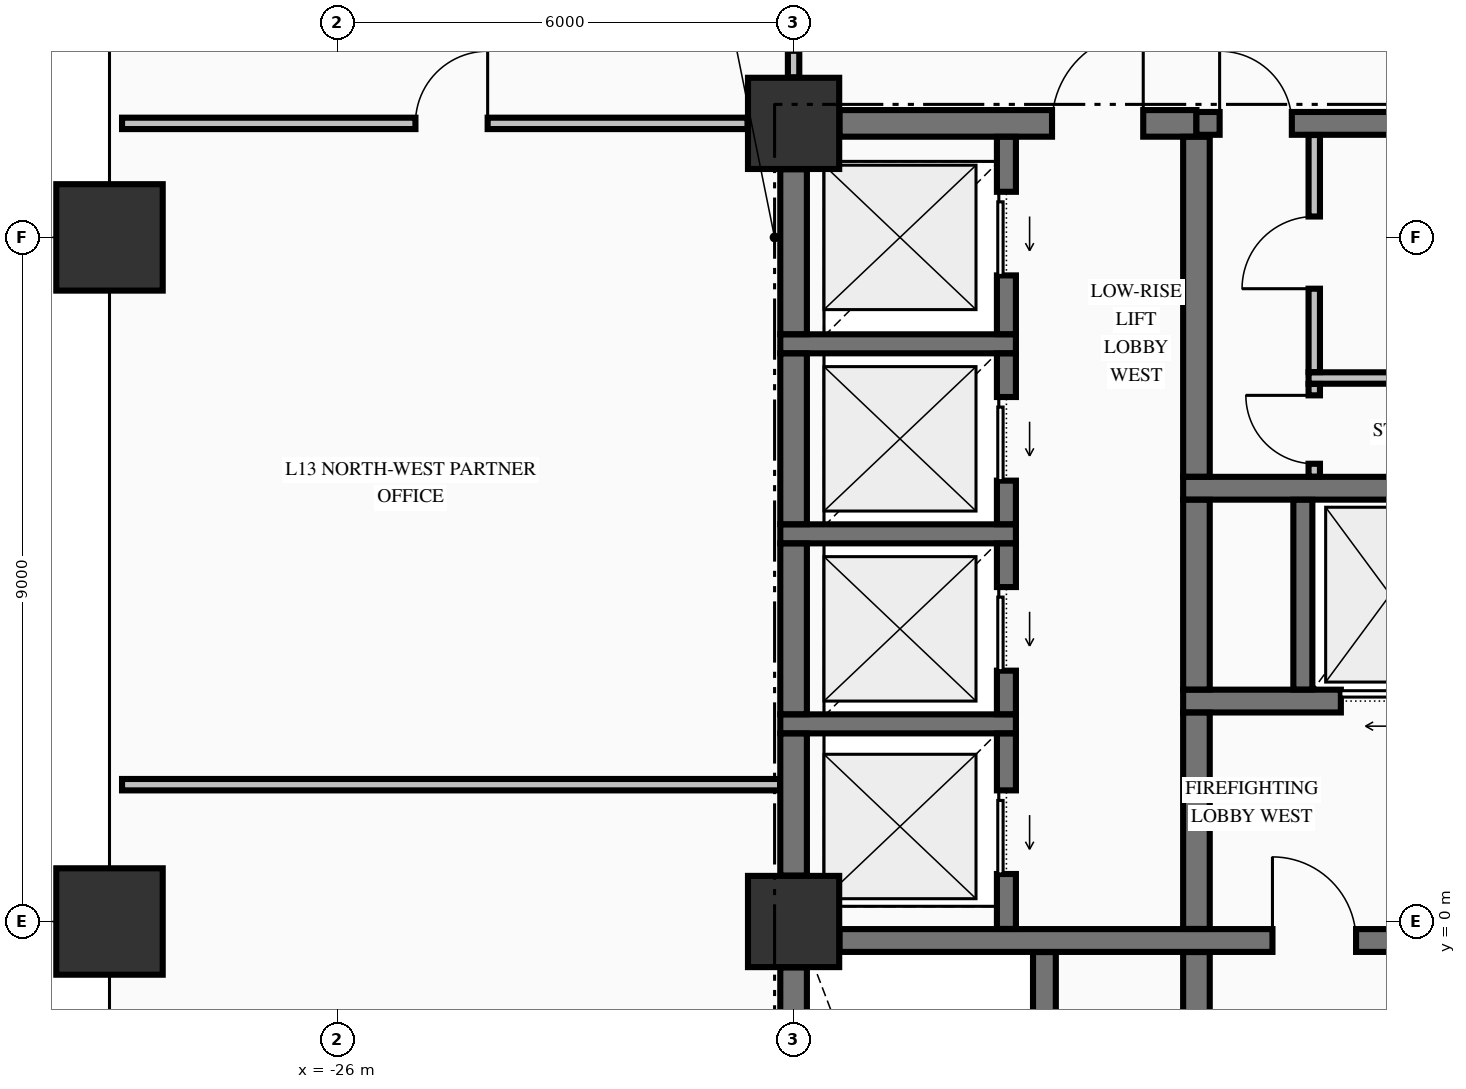
"""IFC4 building model, lengths in metres.
Left out: names, types, materials, properties, quantities, classifications, styles, units other than length and angle.
Written with IfcOpenShell. Run it as: python <this file> out.ifc"""

import sys

from ifc_helpers import new_model, si_unit, direction, frame, frame_2d, origin, origin_2d, place, context, subcontext, project, spatial, rectangle, extrude, element, fill, save


model = new_model("IFC4")
c1 = context("Model", 3, precision=1e-05, world=origin(), true_north=direction((0.0, 1.0)))
c2 = subcontext(c1, "Body", "Model", "MODEL_VIEW")
j1 = project(units=[si_unit("LENGTHUNIT", "METRE"), si_unit("PLANEANGLEUNIT", "RADIAN")], contexts=[c1])
p1 = place(None, origin())
s1 = spatial("IfcSite", under=j1, at=p1, CompositionType="ELEMENT")
p2 = place(p1, origin())
s2 = spatial("IfcBuilding", under=s1, at=p2, CompositionType="ELEMENT")
p3 = place(p2, frame((0.0, 0.0, 57.19)))
s3 = spatial("IfcBuildingStorey", under=s2, at=p3, CompositionType="ELEMENT", Elevation=57.19)
for number, where, z_axis, x_axis in (
    (1, (-29.0, 0.0, -0.425), (0.0, 0.0, 1.0), (1.0, 0.0, 0.0)),
    (2, (-29.0, 9.0, -0.425), (0.0, 0.0, 1.0), (1.0, 0.0, 0.0)),
):
    element("IfcColumn", number, at=place(p3, frame(where, z_axis=z_axis, x_axis=x_axis)), inside=s3, PredefinedType="COLUMN", context=c2, shape_type="SweptSolid", body=[
        extrude(rectangle(XDim=1.4, YDim=1.4, at=origin_2d()), origin(), (0.0, 0.0, 1.0), 3.695),
    ])
for number, where, z_axis, x_axis in (
    (3, (-20.0, 10.5, -0.425), (0.0, 0.0, 1.0), (1.0, 0.0, 0.0)),
    (4, (-20.0, 0.0, -0.425), (0.0, 0.0, 1.0), (1.0, 0.0, 0.0)),
):
    element("IfcColumn", number, at=place(p3, frame(where, z_axis=z_axis, x_axis=x_axis)), inside=s3, PredefinedType="COLUMN", context=c2, shape_type="SweptSolid", body=[
        extrude(rectangle(XDim=1.2, YDim=1.2, at=origin_2d()), origin(), (0.0, 0.0, 1.0), 3.695),
    ])
p4 = place(p3, frame((-19.396, -0.25, 0.0), z_axis=(0.0, 0.0, 1.0), x_axis=(1.0, 0.0, 0.0)))
e5 = element("IfcWall", 5, at=p4, inside=s3, PredefinedType="SHEAR", context=c2, shape_type="SweptSolid", body=[
    extrude(rectangle(XDim=7.792, YDim=0.3, at=frame_2d((3.896, 0.0))), origin(), (0.0, 0.0, 1.0), 3.27),
])
p5 = place(p4, frame((5.696, 0.0, 0.0)))
e6 = element("IfcOpeningElement", 6, at=p5, cuts=e5, PredefinedType="OPENING", context=c2, shape_type="SweptSolid", body=[
    extrude(rectangle(XDim=1.1, YDim=2.15, at=frame_2d((0.55, 1.075))), frame((0.0, 0.16, 0.0), z_axis=(0.0, -1.0, 0.0), x_axis=(1.0, 0.0, 0.0)), (0.0, 0.0, 1.0), 0.32),
])
p6 = place(p3, frame((-20.175, 2.6, 0.0), z_axis=(0.0, 0.0, 1.0), x_axis=(1.0, 0.0, 0.0)))
e7 = element("IfcWall", 7, at=p6, inside=s3, PredefinedType="SOLIDWALL", context=c2, shape_type="SweptSolid", body=[
    extrude(rectangle(XDim=3.1, YDim=0.25, at=frame_2d((1.55, 0.0))), origin(), (0.0, 0.0, 1.0), 3.27),
])
p7 = place(p3, frame((-14.875, 2.9, 0.0), z_axis=(0.0, 0.0, 1.0), x_axis=(1.0, 0.0, 0.0)))
e8 = element("IfcWall", 8, at=p7, inside=s3, PredefinedType="SHEAR", context=c2, shape_type="SweptSolid", body=[
    extrude(rectangle(XDim=4.025, YDim=0.3, at=frame_2d((2.012, 0.0))), origin(), (0.0, 0.0, 1.0), 3.27),
])
p8 = place(p7, frame((2.075, 0.0, 0.0)))
e9 = element("IfcOpeningElement", 9, at=p8, cuts=e8, PredefinedType="OPENING", context=c2, shape_type="SweptSolid", body=[
    extrude(rectangle(XDim=1.1, YDim=2.2, at=frame_2d((0.55, 1.1))), frame((0.0, 0.16, 0.0), z_axis=(0.0, -1.0, 0.0), x_axis=(1.0, 0.0, 0.0)), (0.0, 0.0, 1.0), 0.32),
])
p9 = place(p3, frame((-20.175, 5.1, 0.0), z_axis=(0.0, 0.0, 1.0), x_axis=(1.0, 0.0, 0.0)))
e10 = element("IfcWall", 10, at=p9, inside=s3, PredefinedType="SOLIDWALL", context=c2, shape_type="SweptSolid", body=[
    extrude(rectangle(XDim=3.1, YDim=0.25, at=frame_2d((1.55, 0.0))), origin(), (0.0, 0.0, 1.0), 3.27),
])
p10 = place(p3, frame((-14.875, 5.7, 0.0), z_axis=(0.0, 0.0, 1.0), x_axis=(1.0, 0.0, 0.0)))
e11 = element("IfcWall", 11, at=p10, inside=s3, PredefinedType="SHEAR", context=c2, shape_type="SweptSolid", body=[
    extrude(rectangle(XDim=4.025, YDim=0.3, at=frame_2d((2.012, 0.0))), origin(), (0.0, 0.0, 1.0), 3.27),
])
p11 = place(p3, frame((-20.175, 7.6, 0.0), z_axis=(0.0, 0.0, 1.0), x_axis=(1.0, 0.0, 0.0)))
e12 = element("IfcWall", 12, at=p11, inside=s3, PredefinedType="SOLIDWALL", context=c2, shape_type="SweptSolid", body=[
    extrude(rectangle(XDim=3.1, YDim=0.25, at=frame_2d((1.55, 0.0))), origin(), (0.0, 0.0, 1.0), 3.27),
])
p12 = place(p3, frame((-19.396, 10.5, 0.0), z_axis=(0.0, 0.0, 1.0), x_axis=(1.0, 0.0, 0.0)))
e13 = element("IfcWall", 13, at=p12, inside=s3, PredefinedType="SHEAR", context=c2, shape_type="SweptSolid", body=[
    extrude(rectangle(XDim=4.696, YDim=0.35, at=frame_2d((2.348, 0.0))), origin(), (0.0, 0.0, 1.0), 3.27),
])
p13 = place(p12, frame((2.796, 0.0, 0.0)))
e14 = element("IfcOpeningElement", 14, at=p13, cuts=e13, PredefinedType="OPENING", context=c2, shape_type="SweptSolid", body=[
    extrude(rectangle(XDim=1.2, YDim=2.15, at=frame_2d((0.6, 1.075))), frame((0.0, 0.185, 0.0), z_axis=(0.0, -1.0, 0.0), x_axis=(1.0, 0.0, 0.0)), (0.0, 0.0, 1.0), 0.37),
])
p14 = place(p3, frame((-14.7, 10.5, 0.0), z_axis=(0.0, 0.0, 1.0), x_axis=(1.0, 0.0, 0.0)))
e15 = element("IfcWall", 15, at=p14, inside=s3, PredefinedType="SHEAR", context=c2, shape_type="SweptSolid", body=[
    extrude(rectangle(XDim=3.096, YDim=0.3, at=frame_2d((1.548, 0.0))), origin(), (0.0, 0.0, 1.0), 3.27),
])
p15 = place(p14, frame((0.305, 0.0, 0.0)))
e16 = element("IfcOpeningElement", 16, at=p15, cuts=e15, PredefinedType="OPENING", context=c2, shape_type="SweptSolid", body=[
    extrude(rectangle(XDim=0.95, YDim=2.15, at=frame_2d((0.475, 1.075))), frame((0.0, 0.16, 0.0), z_axis=(0.0, -1.0, 0.0), x_axis=(1.0, 0.0, 0.0)), (0.0, 0.0, 1.0), 0.32),
])
p16 = place(p3, frame((-28.835, 1.8, 0.0), z_axis=(0.0, 0.0, 1.0), x_axis=(1.0, 0.0, 0.0)))
e17 = element("IfcWall", 17, at=p16, inside=s3, PredefinedType="PARTITIONING", context=c2, shape_type="SweptSolid", body=[
    extrude(rectangle(XDim=8.657, YDim=0.15, at=frame_2d((4.329, 0.0))), origin(), (0.0, 0.0, 1.0), 3.27),
])
p17 = place(p3, frame((-13.225, 7.15, 0.0), z_axis=(0.0, 0.0, 1.0), x_axis=(1.0, 0.0, 0.0)))
e18 = element("IfcWall", 18, at=p17, inside=s3, PredefinedType="PARTITIONING", context=c2, shape_type="SweptSolid", body=[
    extrude(rectangle(XDim=2.072, YDim=0.15, at=frame_2d((1.036, 0.0))), origin(), (0.0, 0.0, 1.0), 3.27),
])
p18 = place(p3, frame((-28.835, 10.5, 0.0), z_axis=(0.0, 0.0, 1.0), x_axis=(1.0, 0.0, 0.0)))
e19 = element("IfcWall", 19, at=p18, inside=s3, PredefinedType="PARTITIONING", context=c2, shape_type="SweptSolid", body=[
    extrude(rectangle(XDim=8.229, YDim=0.15, at=frame_2d((4.115, 0.0))), origin(), (0.0, 0.0, 1.0), 3.27),
])
p19 = place(p18, frame((3.86, 0.0, 0.0)))
e20 = element("IfcOpeningElement", 20, at=p19, cuts=e19, PredefinedType="OPENING", context=c2, shape_type="SweptSolid", body=[
    extrude(rectangle(XDim=0.95, YDim=2.15, at=frame_2d((0.475, 1.075))), frame((0.0, 0.085, 0.0), z_axis=(0.0, -1.0, 0.0), x_axis=(1.0, 0.0, 0.0)), (0.0, 0.0, 1.0), 0.17),
])
p20 = place(p3, frame((-20.0, -9.346, 0.0), z_axis=(0.0, 0.0, 1.0), x_axis=(0.0, 1.0, 0.0)))
e21 = element("IfcWall", 21, at=p20, inside=s3, PredefinedType="SHEAR", context=c2, shape_type="SweptSolid", body=[
    extrude(rectangle(XDim=8.742, YDim=0.35, at=frame_2d((4.371, 0.0))), origin(), (0.0, 0.0, 1.0), 3.27),
])
p21 = place(p3, frame((-20.0, 0.604, 0.0), z_axis=(0.0, 0.0, 1.0), x_axis=(0.0, 1.0, 0.0)))
e22 = element("IfcWall", 22, at=p21, inside=s3, PredefinedType="SHEAR", context=c2, shape_type="SweptSolid", body=[
    extrude(rectangle(XDim=1.869, YDim=0.35, at=frame_2d((0.935, 0.0))), origin(), (0.0, 0.0, 1.0), 3.27),
])
for number, where, z_axis, x_axis in (
    (23, (-20.0, 2.727, 0.0), (0.0, 0.0, 1.0), (0.0, 1.0, 0.0)),
    (24, (-20.0, 5.227, 0.0), (0.0, 0.0, 1.0), (0.0, 1.0, 0.0)),
):
    element("IfcWall", number, at=place(p3, frame(where, z_axis=z_axis, x_axis=x_axis)), inside=s3, PredefinedType="SHEAR", context=c2, shape_type="SweptSolid", body=[
        extrude(rectangle(XDim=2.246, YDim=0.35, at=frame_2d((1.123, 0.0))), origin(), (0.0, 0.0, 1.0), 3.27),
    ])
p22 = place(p3, frame((-20.0, 7.727, 0.0), z_axis=(0.0, 0.0, 1.0), x_axis=(0.0, 1.0, 0.0)))
e25 = element("IfcWall", 25, at=p22, inside=s3, PredefinedType="SHEAR", context=c2, shape_type="SweptSolid", body=[
    extrude(rectangle(XDim=2.169, YDim=0.35, at=frame_2d((1.084, 0.0))), origin(), (0.0, 0.0, 1.0), 3.27),
])
p23 = place(p3, frame((-17.2, -0.098, 0.0), z_axis=(0.0, 0.0, 1.0), x_axis=(0.0, 1.0, 0.0)))
e26 = element("IfcWall", 26, at=p23, inside=s3, PredefinedType="SOLIDWALL", context=c2, shape_type="SweptSolid", body=[
    extrude(rectangle(XDim=2.571, YDim=0.25, at=frame_2d((1.285, 0.0))), origin(), (0.0, 0.0, 1.0), 3.27),
])
p24 = place(p23, frame((0.723, 0.0, 0.0)))
e27 = element("IfcOpeningElement", 27, at=p24, cuts=e26, PredefinedType="OPENING", context=c2, shape_type="SweptSolid", body=[
    extrude(rectangle(XDim=1.1, YDim=2.2, at=frame_2d((0.55, 1.1))), frame((0.0, 0.135, 0.0), z_axis=(0.0, -1.0, 0.0), x_axis=(1.0, 0.0, 0.0)), (0.0, 0.0, 1.0), 0.27),
])
p25 = place(p3, frame((-17.2, 2.727, 0.0), z_axis=(0.0, 0.0, 1.0), x_axis=(0.0, 1.0, 0.0)))
e28 = element("IfcWall", 28, at=p25, inside=s3, PredefinedType="SOLIDWALL", context=c2, shape_type="SweptSolid", body=[
    extrude(rectangle(XDim=2.246, YDim=0.25, at=frame_2d((1.123, 0.0))), origin(), (0.0, 0.0, 1.0), 3.27),
])
p26 = place(p25, frame((0.573, 0.0, 0.0)))
e29 = element("IfcOpeningElement", 29, at=p26, cuts=e28, PredefinedType="OPENING", context=c2, shape_type="SweptSolid", body=[
    extrude(rectangle(XDim=1.1, YDim=2.2, at=frame_2d((0.55, 1.1))), frame((0.0, 0.135, 0.0), z_axis=(0.0, -1.0, 0.0), x_axis=(1.0, 0.0, 0.0)), (0.0, 0.0, 1.0), 0.27),
])
p27 = place(p3, frame((-17.2, 5.227, 0.0), z_axis=(0.0, 0.0, 1.0), x_axis=(0.0, 1.0, 0.0)))
e30 = element("IfcWall", 30, at=p27, inside=s3, PredefinedType="SOLIDWALL", context=c2, shape_type="SweptSolid", body=[
    extrude(rectangle(XDim=2.246, YDim=0.25, at=frame_2d((1.123, 0.0))), origin(), (0.0, 0.0, 1.0), 3.27),
])
p28 = place(p27, frame((0.573, 0.0, 0.0)))
e31 = element("IfcOpeningElement", 31, at=p28, cuts=e30, PredefinedType="OPENING", context=c2, shape_type="SweptSolid", body=[
    extrude(rectangle(XDim=1.1, YDim=2.2, at=frame_2d((0.55, 1.1))), frame((0.0, 0.135, 0.0), z_axis=(0.0, -1.0, 0.0), x_axis=(1.0, 0.0, 0.0)), (0.0, 0.0, 1.0), 0.27),
])
p29 = place(p3, frame((-17.2, 7.727, 0.0), z_axis=(0.0, 0.0, 1.0), x_axis=(0.0, 1.0, 0.0)))
e32 = element("IfcWall", 32, at=p29, inside=s3, PredefinedType="SOLIDWALL", context=c2, shape_type="SweptSolid", body=[
    extrude(rectangle(XDim=2.596, YDim=0.25, at=frame_2d((1.298, 0.0))), origin(), (0.0, 0.0, 1.0), 3.27),
])
p30 = place(p29, frame((0.773, 0.0, 0.0)))
e33 = element("IfcOpeningElement", 33, at=p30, cuts=e32, PredefinedType="OPENING", context=c2, shape_type="SweptSolid", body=[
    extrude(rectangle(XDim=1.1, YDim=2.2, at=frame_2d((0.55, 1.1))), frame((0.0, 0.135, 0.0), z_axis=(0.0, -1.0, 0.0), x_axis=(1.0, 0.0, 0.0)), (0.0, 0.0, 1.0), 0.27),
])
p31 = place(p3, frame((-16.7, -9.773, 0.0), z_axis=(0.0, 0.0, 1.0), x_axis=(0.0, 1.0, 0.0)))
e34 = element("IfcWall", 34, at=p31, inside=s3, PredefinedType="SHEAR", context=c2, shape_type="SweptSolid", body=[
    extrude(rectangle(XDim=9.371, YDim=0.3, at=frame_2d((4.686, 0.0))), origin(), (0.0, 0.0, 1.0), 3.27),
])
p32 = place(p3, frame((-14.7, -9.773, 0.0), z_axis=(0.0, 0.0, 1.0), x_axis=(0.0, 1.0, 0.0)))
e35 = element("IfcWall", 35, at=p32, inside=s3, PredefinedType="SHEAR", context=c2, shape_type="SweptSolid", body=[
    extrude(rectangle(XDim=9.371, YDim=0.35, at=frame_2d((4.686, 0.0))), origin(), (0.0, 0.0, 1.0), 3.27),
])
p33 = place(p3, frame((-14.7, -0.098, 0.0), z_axis=(0.0, 0.0, 1.0), x_axis=(0.0, 1.0, 0.0)))
e36 = element("IfcWall", 36, at=p33, inside=s3, PredefinedType="SHEAR", context=c2, shape_type="SweptSolid", body=[
    extrude(rectangle(XDim=2.846, YDim=0.35, at=frame_2d((1.423, 0.0))), origin(), (0.0, 0.0, 1.0), 3.27),
])
p34 = place(p3, frame((-14.7, 3.052, 0.0), z_axis=(0.0, 0.0, 1.0), x_axis=(0.0, 1.0, 0.0)))
e37 = element("IfcWall", 37, at=p34, inside=s3, PredefinedType="SHEAR", context=c2, shape_type="SweptSolid", body=[
    extrude(rectangle(XDim=2.496, YDim=0.35, at=frame_2d((1.248, 0.0))), origin(), (0.0, 0.0, 1.0), 3.27),
])
p35 = place(p3, frame((-14.7, 5.852, 0.0), z_axis=(0.0, 0.0, 1.0), x_axis=(0.0, 1.0, 0.0)))
e38 = element("IfcWall", 38, at=p35, inside=s3, PredefinedType="SHEAR", context=c2, shape_type="SweptSolid", body=[
    extrude(rectangle(XDim=4.471, YDim=0.35, at=frame_2d((2.235, 0.0))), origin(), (0.0, 0.0, 1.0), 3.27),
])
p36 = place(p3, frame((-13.3, 3.052, 0.0), z_axis=(0.0, 0.0, 1.0), x_axis=(0.0, 1.0, 0.0)))
e39 = element("IfcWall", 39, at=p36, inside=s3, PredefinedType="SOLIDWALL", context=c2, shape_type="SweptSolid", body=[
    extrude(rectangle(XDim=2.496, YDim=0.25, at=frame_2d((1.248, 0.0))), origin(), (0.0, 0.0, 1.0), 3.27),
])
p37 = place(p3, frame((-20.0, 11.106, 0.0), z_axis=(0.0, 0.0, 1.0), x_axis=(0.0, 1.0, 0.0)))
e40 = element("IfcWall", 40, at=p37, inside=s3, PredefinedType="PARTITIONING", context=c2, shape_type="SweptSolid", body=[
    extrude(rectangle(XDim=2.166, YDim=0.15, at=frame_2d((1.083, 0.0))), origin(), (0.0, 0.0, 1.0), 2.61),
])
p38 = place(p37, frame((0.349, 0.0, 0.0)))
e41 = element("IfcOpeningElement", 41, at=p38, cuts=e40, PredefinedType="OPENING", context=c2, shape_type="SweptSolid", body=[
    extrude(rectangle(XDim=0.95, YDim=2.15, at=frame_2d((0.475, 1.075))), frame((0.0, 0.085, 0.0), z_axis=(0.0, -1.0, 0.0), x_axis=(1.0, 0.0, 0.0)), (0.0, 0.0, 1.0), 0.17),
])
p39 = place(p3, frame((-13.15, 5.853, 0.0), z_axis=(0.0, 0.0, 1.0), x_axis=(0.0, 1.0, 0.0)))
e42 = element("IfcWall", 42, at=p39, inside=s3, PredefinedType="PARTITIONING", context=c2, shape_type="SweptSolid", body=[
    extrude(rectangle(XDim=1.219, YDim=0.15, at=frame_2d((0.609, 0.0))), origin(), (0.0, 0.0, 1.0), 3.27),
])
p40 = place(p39, frame((0.169, 0.0, 0.0)))
e43 = element("IfcOpeningElement", 43, at=p40, cuts=e42, PredefinedType="OPENING", context=c2, shape_type="SweptSolid", body=[
    extrude(rectangle(XDim=0.9, YDim=2.15, at=frame_2d((0.45, 1.075))), frame((0.0, 0.085, 0.0), z_axis=(0.0, -1.0, 0.0), x_axis=(1.0, 0.0, 0.0)), (0.0, 0.0, 1.0), 0.17),
])
p41 = place(p3, frame((-13.15, 7.228, 0.0), z_axis=(0.0, 0.0, 1.0), x_axis=(0.0, 1.0, 0.0)))
e44 = element("IfcWall", 44, at=p41, inside=s3, PredefinedType="PARTITIONING", context=c2, shape_type="SweptSolid", body=[
    extrude(rectangle(XDim=3.119, YDim=0.15, at=frame_2d((1.56, 0.0))), origin(), (0.0, 0.0, 1.0), 3.27),
])
p42 = place(p41, frame((1.097, 0.0, 0.0)))
e45 = element("IfcOpeningElement", 45, at=p42, cuts=e44, PredefinedType="OPENING", context=c2, shape_type="SweptSolid", body=[
    extrude(rectangle(XDim=0.95, YDim=2.15, at=frame_2d((0.475, 1.075))), frame((0.0, 0.085, 0.0), z_axis=(0.0, -1.0, 0.0), x_axis=(1.0, 0.0, 0.0)), (0.0, 0.0, 1.0), 0.17),
])
p43 = place(p5, origin())
e46 = element("IfcDoor", 46, at=p43, inside=s3, OperationType="SINGLE_SWING_LEFT", PredefinedType="DOOR", context=c2, shape_type="SweptSolid", body=[
    extrude(rectangle(XDim=1.1, YDim=2.15, at=frame_2d((0.55, 1.075))), frame((0.0, 0.025, 0.0), z_axis=(0.0, -1.0, 0.0), x_axis=(1.0, 0.0, 0.0)), (0.0, 0.0, 1.0), 0.05),
])
fill(e6, e46)
p44 = place(p8, origin())
e47 = element("IfcDoor", 47, at=p44, inside=s3, OperationType="SLIDING_TO_LEFT", PredefinedType="DOOR", context=c2, shape_type="SweptSolid", body=[
    extrude(rectangle(XDim=1.1, YDim=2.2, at=frame_2d((0.55, 1.1))), frame((0.0, 0.025, 0.0), z_axis=(0.0, -1.0, 0.0), x_axis=(1.0, 0.0, 0.0)), (0.0, 0.0, 1.0), 0.05),
])
fill(e9, e47)
p45 = place(p15, origin())
e48 = element("IfcDoor", 48, at=p45, inside=s3, OperationType="SINGLE_SWING_LEFT", PredefinedType="DOOR", context=c2, shape_type="SweptSolid", body=[
    extrude(rectangle(XDim=0.95, YDim=2.15, at=frame_2d((0.475, 1.075))), frame((0.0, 0.025, 0.0), z_axis=(0.0, -1.0, 0.0), x_axis=(1.0, 0.0, 0.0)), (0.0, 0.0, 1.0), 0.05),
])
fill(e16, e48)
p46 = place(p40, origin())
e49 = element("IfcDoor", 49, at=p46, inside=s3, OperationType="SINGLE_SWING_RIGHT", PredefinedType="DOOR", context=c2, shape_type="SweptSolid", body=[
    extrude(rectangle(XDim=0.9, YDim=2.15, at=frame_2d((0.45, 1.075))), frame((0.0, 0.025, 0.0), z_axis=(0.0, -1.0, 0.0), x_axis=(1.0, 0.0, 0.0)), (0.0, 0.0, 1.0), 0.05),
])
fill(e43, e49)
p47 = place(p42, origin())
e50 = element("IfcDoor", 50, at=p47, inside=s3, OperationType="SINGLE_SWING_LEFT", PredefinedType="DOOR", context=c2, shape_type="SweptSolid", body=[
    extrude(rectangle(XDim=0.95, YDim=2.15, at=frame_2d((0.475, 1.075))), frame((0.0, 0.025, 0.0), z_axis=(0.0, -1.0, 0.0), x_axis=(1.0, 0.0, 0.0)), (0.0, 0.0, 1.0), 0.05),
])
fill(e45, e50)
p48 = place(p13, origin())
e51 = element("IfcDoor", 51, at=p48, inside=s3, OperationType="SINGLE_SWING_RIGHT", PredefinedType="DOOR", context=c2, shape_type="SweptSolid", body=[
    extrude(rectangle(XDim=1.2, YDim=2.15, at=frame_2d((0.6, 1.075))), frame((0.0, 0.025, 0.0), z_axis=(0.0, -1.0, 0.0), x_axis=(1.0, 0.0, 0.0)), (0.0, 0.0, 1.0), 0.05),
])
fill(e14, e51)
p49 = place(p24, origin())
e52 = element("IfcDoor", 52, at=p49, inside=s3, OperationType="SLIDING_TO_LEFT", PredefinedType="DOOR", context=c2, shape_type="SweptSolid", body=[
    extrude(rectangle(XDim=1.1, YDim=2.2, at=frame_2d((0.55, 1.1))), frame((0.0, 0.025, 0.0), z_axis=(0.0, -1.0, 0.0), x_axis=(1.0, 0.0, 0.0)), (0.0, 0.0, 1.0), 0.05),
])
fill(e27, e52)
p50 = place(p26, origin())
e53 = element("IfcDoor", 53, at=p50, inside=s3, OperationType="SLIDING_TO_LEFT", PredefinedType="DOOR", context=c2, shape_type="SweptSolid", body=[
    extrude(rectangle(XDim=1.1, YDim=2.2, at=frame_2d((0.55, 1.1))), frame((0.0, 0.025, 0.0), z_axis=(0.0, -1.0, 0.0), x_axis=(1.0, 0.0, 0.0)), (0.0, 0.0, 1.0), 0.05),
])
fill(e29, e53)
p51 = place(p28, origin())
e54 = element("IfcDoor", 54, at=p51, inside=s3, OperationType="SLIDING_TO_LEFT", PredefinedType="DOOR", context=c2, shape_type="SweptSolid", body=[
    extrude(rectangle(XDim=1.1, YDim=2.2, at=frame_2d((0.55, 1.1))), frame((0.0, 0.025, 0.0), z_axis=(0.0, -1.0, 0.0), x_axis=(1.0, 0.0, 0.0)), (0.0, 0.0, 1.0), 0.05),
])
fill(e31, e54)
p52 = place(p30, origin())
e55 = element("IfcDoor", 55, at=p52, inside=s3, OperationType="SLIDING_TO_LEFT", PredefinedType="DOOR", context=c2, shape_type="SweptSolid", body=[
    extrude(rectangle(XDim=1.1, YDim=2.2, at=frame_2d((0.55, 1.1))), frame((0.0, 0.025, 0.0), z_axis=(0.0, -1.0, 0.0), x_axis=(1.0, 0.0, 0.0)), (0.0, 0.0, 1.0), 0.05),
])
fill(e33, e55)
p53 = place(p19, origin())
e56 = element("IfcDoor", 56, at=p53, inside=s3, OperationType="SINGLE_SWING_RIGHT", PredefinedType="DOOR", context=c2, shape_type="SweptSolid", body=[
    extrude(rectangle(XDim=0.95, YDim=2.15, at=frame_2d((0.475, 1.075))), frame((0.0, 0.025, 0.0), z_axis=(0.0, -1.0, 0.0), x_axis=(1.0, 0.0, 0.0)), (0.0, 0.0, 1.0), 0.05),
])
fill(e20, e56)
save(model, sys.argv[1])
